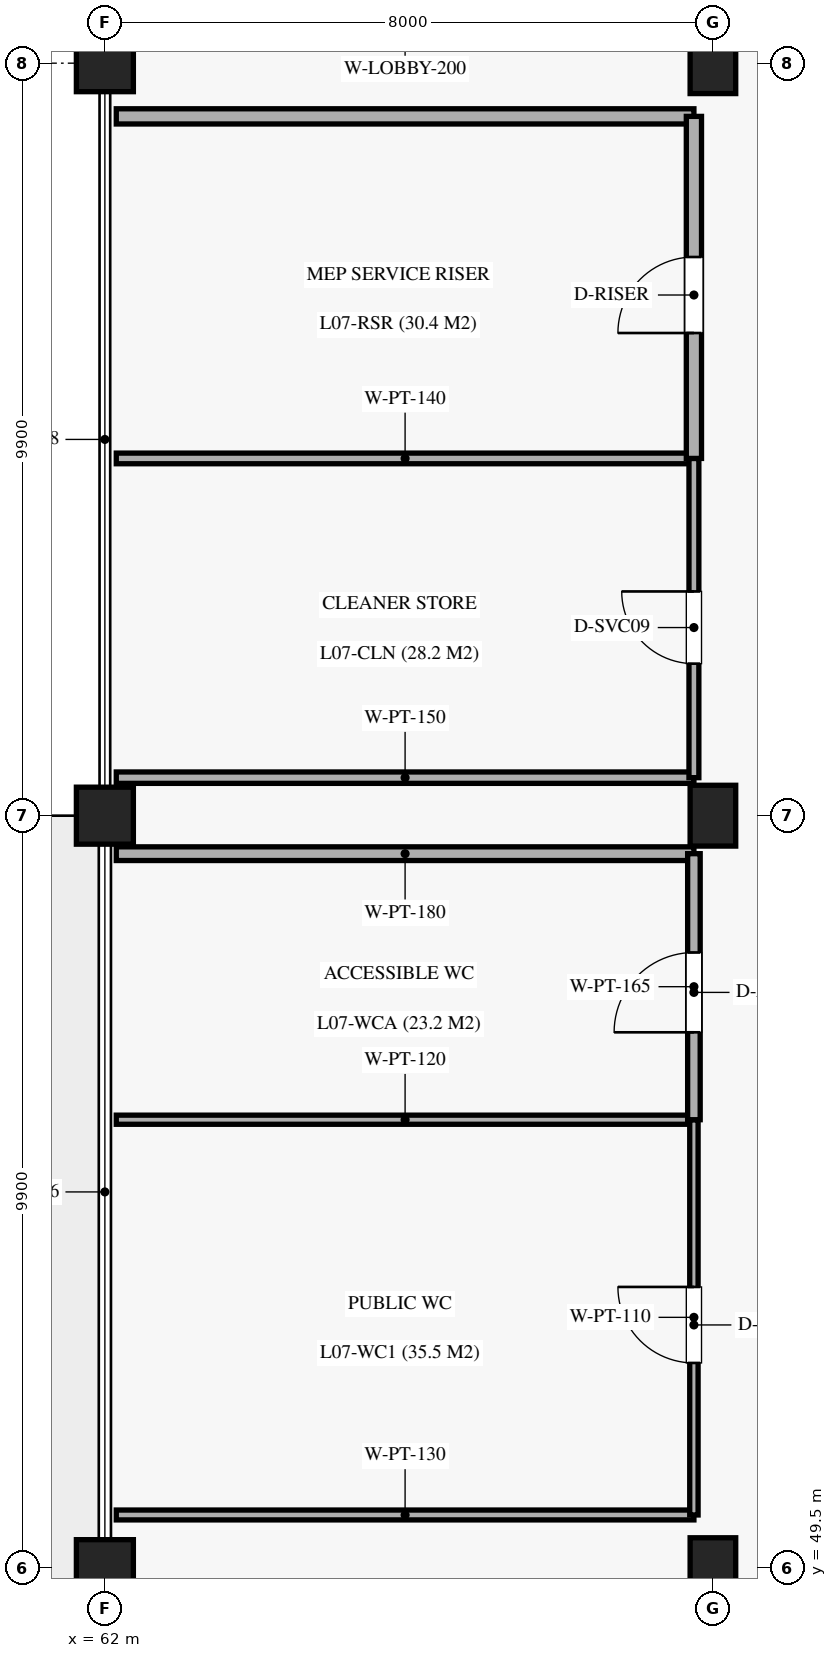
"""IFC4 building model, lengths in metres.
Left out: names, types, materials, properties, quantities, classifications, styles, units other than length and angle.
Written with IfcOpenShell. Run it as: python <this file> out.ifc"""

import sys

from ifc_helpers import new_model, si_unit, direction, frame, frame_2d, origin, origin_2d, place, context, subcontext, project, spatial, rectangle, extrude, element, fill, save


model = new_model("IFC4")
c1 = context("Model", 3, precision=1e-05, world=origin(), true_north=direction((0.0, 1.0)))
c2 = subcontext(c1, "Body", "Model", "MODEL_VIEW")
j1 = project(units=[si_unit("LENGTHUNIT", "METRE"), si_unit("PLANEANGLEUNIT", "RADIAN")], contexts=[c1])
p1 = place(None, origin())
s1 = spatial("IfcSite", under=j1, at=p1, CompositionType="ELEMENT")
p2 = place(p1, origin())
s2 = spatial("IfcBuilding", under=s1, at=p2, CompositionType="ELEMENT")
p3 = place(p2, frame((0.0, 0.0, 37.74)))
s3 = spatial("IfcBuildingStorey", under=s2, at=p3, CompositionType="ELEMENT", Elevation=37.74)
for number, where, z_axis, x_axis in (
    (1, (62.0, 49.5, 0.0), (0.0, 0.0, 1.0), (1.0, 0.0, 0.0)),
    (2, (62.0, 59.4, 0.0), (0.0, 0.0, 1.0), (1.0, 0.0, 0.0)),
    (3, (62.0, 69.3, 0.0), (0.0, 0.0, 1.0), (1.0, 0.0, 0.0)),
):
    element("IfcColumn", number, at=place(p3, frame(where, z_axis=z_axis, x_axis=x_axis)), inside=s3, PredefinedType="COLUMN", context=c2, shape_type="SweptSolid", body=[
        extrude(rectangle(XDim=0.75, YDim=0.75, at=origin_2d()), origin(), (0.0, 0.0, 1.0), 4.59),
    ])
for number, where, z_axis, x_axis in (
    (4, (70.0, 49.5, 0.0), (0.0, 0.0, 1.0), (1.0, 0.0, 0.0)),
    (5, (70.0, 59.4, 0.0), (0.0, 0.0, 1.0), (1.0, 0.0, 0.0)),
    (6, (70.0, 69.3, 0.0), (0.0, 0.0, 1.0), (1.0, 0.0, 0.0)),
):
    element("IfcColumn", number, at=place(p3, frame(where, z_axis=z_axis, x_axis=x_axis)), inside=s3, PredefinedType="COLUMN", context=c2, shape_type="SweptSolid", body=[
        extrude(rectangle(XDim=0.6, YDim=0.8, at=origin_2d()), origin(), (0.0, 0.0, 1.0), 4.59),
    ])
p4 = place(p3, frame((62.15, 50.2, 0.0), z_axis=(0.0, 0.0, 1.0), x_axis=(1.0, 0.0, 0.0)))
e7 = element("IfcWall", 7, at=p4, inside=s3, PredefinedType="PARTITIONING", context=c2, shape_type="SweptSolid", body=[
    extrude(rectangle(XDim=7.6, YDim=0.13, at=frame_2d((3.8, 0.0))), origin(), (0.0, 0.0, 1.0), 3.43),
])
p5 = place(p3, frame((62.15, 55.4, 0.0), z_axis=(0.0, 0.0, 1.0), x_axis=(1.0, 0.0, 0.0)))
e8 = element("IfcWall", 8, at=p5, inside=s3, PredefinedType="PARTITIONING", context=c2, shape_type="SweptSolid", body=[
    extrude(rectangle(XDim=7.6, YDim=0.12, at=frame_2d((3.8, 0.0))), origin(), (0.0, 0.0, 1.0), 3.43),
])
p6 = place(p3, frame((69.75, 50.2, 0.0), z_axis=(0.0, 0.0, 1.0), x_axis=(0.0, 1.0, 0.0)))
e9 = element("IfcWall", 9, at=p6, inside=s3, PredefinedType="PARTITIONING", context=c2, shape_type="SweptSolid", body=[
    extrude(rectangle(XDim=5.2, YDim=0.11, at=frame_2d((2.6, 0.0))), origin(), (0.0, 0.0, 1.0), 3.43),
])
p7 = place(p6, frame((2.0, 0.0, 0.0)))
e10 = element("IfcOpeningElement", 10, at=p7, cuts=e9, PredefinedType="OPENING", context=c2, shape_type="SweptSolid", body=[
    extrude(rectangle(XDim=1.0, YDim=2.1, at=frame_2d((0.5, 1.05))), frame((0.0, 0.065, 0.0), z_axis=(0.0, -1.0, 0.0), x_axis=(1.0, 0.0, 0.0)), (0.0, 0.0, 1.0), 0.13),
])
p8 = place(p3, frame((62.15, 58.9, 0.0), z_axis=(0.0, 0.0, 1.0), x_axis=(1.0, 0.0, 0.0)))
e11 = element("IfcWall", 11, at=p8, inside=s3, PredefinedType="PARTITIONING", context=c2, shape_type="SweptSolid", body=[
    extrude(rectangle(XDim=7.6, YDim=0.18, at=frame_2d((3.8, 0.0))), origin(), (0.0, 0.0, 1.0), 3.43),
])
p9 = place(p3, frame((69.75, 55.4, 0.0), z_axis=(0.0, 0.0, 1.0), x_axis=(0.0, 1.0, 0.0)))
e12 = element("IfcWall", 12, at=p9, inside=s3, PredefinedType="PARTITIONING", context=c2, shape_type="SweptSolid", body=[
    extrude(rectangle(XDim=3.5, YDim=0.165, at=frame_2d((1.75, 0.0))), origin(), (0.0, 0.0, 1.0), 3.43),
])
p10 = place(p9, frame((1.15, 0.0, 0.0)))
e13 = element("IfcOpeningElement", 13, at=p10, cuts=e12, PredefinedType="OPENING", context=c2, shape_type="SweptSolid", body=[
    extrude(rectangle(XDim=1.05, YDim=2.15, at=frame_2d((0.525, 1.075))), frame((0.0, 0.093, 0.0), z_axis=(0.0, -1.0, 0.0), x_axis=(1.0, 0.0, 0.0)), (0.0, 0.0, 1.0), 0.185),
])
p11 = place(p3, frame((62.15, 59.9, 0.0), z_axis=(0.0, 0.0, 1.0), x_axis=(1.0, 0.0, 0.0)))
e14 = element("IfcWall", 14, at=p11, inside=s3, PredefinedType="PARTITIONING", context=c2, shape_type="SweptSolid", body=[
    extrude(rectangle(XDim=7.6, YDim=0.15, at=frame_2d((3.8, 0.0))), origin(), (0.0, 0.0, 1.0), 3.43),
])
p12 = place(p3, frame((62.15, 64.1, 0.0), z_axis=(0.0, 0.0, 1.0), x_axis=(1.0, 0.0, 0.0)))
e15 = element("IfcWall", 15, at=p12, inside=s3, PredefinedType="PARTITIONING", context=c2, shape_type="SweptSolid", body=[
    extrude(rectangle(XDim=7.6, YDim=0.14, at=frame_2d((3.8, 0.0))), origin(), (0.0, 0.0, 1.0), 3.43),
])
p13 = place(p3, frame((69.75, 59.9, 0.0), z_axis=(0.0, 0.0, 1.0), x_axis=(0.0, 1.0, 0.0)))
e16 = element("IfcWall", 16, at=p13, inside=s3, PredefinedType="PARTITIONING", context=c2, shape_type="SweptSolid", body=[
    extrude(rectangle(XDim=4.2, YDim=0.13, at=frame_2d((2.1, 0.0))), origin(), (0.0, 0.0, 1.0), 3.43),
])
p14 = place(p13, frame((1.5, 0.0, 0.0)))
e17 = element("IfcOpeningElement", 17, at=p14, cuts=e16, PredefinedType="OPENING", context=c2, shape_type="SweptSolid", body=[
    extrude(rectangle(XDim=0.95, YDim=2.1, at=frame_2d((0.475, 1.05))), frame((0.0, 0.075, 0.0), z_axis=(0.0, -1.0, 0.0), x_axis=(1.0, 0.0, 0.0)), (0.0, 0.0, 1.0), 0.15),
])
p15 = place(p3, frame((62.15, 68.6, 0.0), z_axis=(0.0, 0.0, 1.0), x_axis=(1.0, 0.0, 0.0)))
e18 = element("IfcWall", 18, at=p15, inside=s3, PredefinedType="SOLIDWALL", context=c2, shape_type="SweptSolid", body=[
    extrude(rectangle(XDim=7.6, YDim=0.2, at=frame_2d((3.8, 0.0))), origin(), (0.0, 0.0, 1.0), 3.43),
])
p16 = place(p3, frame((69.75, 64.1, 0.0), z_axis=(0.0, 0.0, 1.0), x_axis=(0.0, 1.0, 0.0)))
e19 = element("IfcWall", 19, at=p16, inside=s3, PredefinedType="SOLIDWALL", context=c2, shape_type="SweptSolid", body=[
    extrude(rectangle(XDim=4.5, YDim=0.2, at=frame_2d((2.25, 0.0))), origin(), (0.0, 0.0, 1.0), 3.43),
])
p17 = place(p16, frame((1.65, 0.0, 0.0)))
e20 = element("IfcOpeningElement", 20, at=p17, cuts=e19, PredefinedType="OPENING", context=c2, shape_type="SweptSolid", body=[
    extrude(rectangle(XDim=1.0, YDim=2.15, at=frame_2d((0.5, 1.075))), frame((0.0, 0.11, 0.0), z_axis=(0.0, -1.0, 0.0), x_axis=(1.0, 0.0, 0.0)), (0.0, 0.0, 1.0), 0.22),
])
p18 = place(p7, origin())
e21 = element("IfcDoor", 21, at=p18, inside=s3, OperationType="SINGLE_SWING_RIGHT", PredefinedType="DOOR", context=c2, shape_type="SweptSolid", body=[
    extrude(rectangle(XDim=1.0, YDim=2.1, at=frame_2d((0.5, 1.05))), frame((0.0, 0.025, 0.0), z_axis=(0.0, -1.0, 0.0), x_axis=(1.0, 0.0, 0.0)), (0.0, 0.0, 1.0), 0.05),
])
fill(e10, e21)
p19 = place(p10, origin())
e22 = element("IfcDoor", 22, at=p19, inside=s3, OperationType="SINGLE_SWING_LEFT", PredefinedType="DOOR", context=c2, shape_type="SweptSolid", body=[
    extrude(rectangle(XDim=1.05, YDim=2.15, at=frame_2d((0.525, 1.075))), frame((0.0, 0.025, 0.0), z_axis=(0.0, -1.0, 0.0), x_axis=(1.0, 0.0, 0.0)), (0.0, 0.0, 1.0), 0.05),
])
fill(e13, e22)
p20 = place(p14, origin())
e23 = element("IfcDoor", 23, at=p20, inside=s3, OperationType="SINGLE_SWING_RIGHT", PredefinedType="DOOR", context=c2, shape_type="SweptSolid", body=[
    extrude(rectangle(XDim=0.95, YDim=2.1, at=frame_2d((0.475, 1.05))), frame((0.0, 0.025, 0.0), z_axis=(0.0, -1.0, 0.0), x_axis=(1.0, 0.0, 0.0)), (0.0, 0.0, 1.0), 0.05),
])
fill(e17, e23)
p21 = place(p17, origin())
e24 = element("IfcDoor", 24, at=p21, inside=s3, OperationType="SINGLE_SWING_LEFT", PredefinedType="DOOR", context=c2, shape_type="SweptSolid", body=[
    extrude(rectangle(XDim=1.0, YDim=2.15, at=frame_2d((0.5, 1.075))), frame((0.0, 0.025, 0.0), z_axis=(0.0, -1.0, 0.0), x_axis=(1.0, 0.0, 0.0)), (0.0, 0.0, 1.0), 0.05),
])
fill(e20, e24)
save(model, sys.argv[1])
